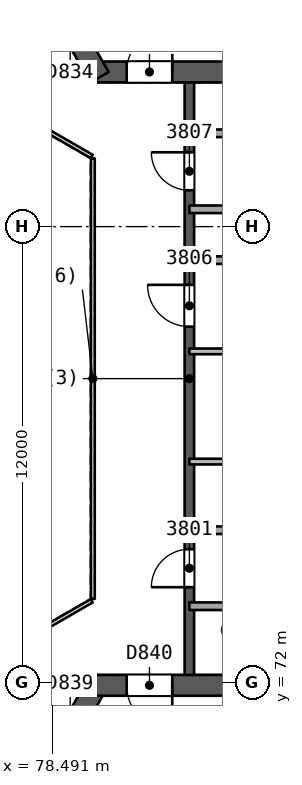
"""IFC4 building model, lengths in metres.
Left out: names, types, materials, properties, quantities, classifications, styles, units other than length and angle.
Written with IfcOpenShell. Run it as: python <this file> out.ifc"""

import sys

from ifc_helpers import new_model, si_unit, direction, frame, frame_2d, origin, place, context, subcontext, project, spatial, rectangle, extrude, element, fill, save


model = new_model("IFC4")
c1 = context("Model", 3, precision=1e-05, world=origin(), true_north=direction((0.0, 1.0)))
c2 = subcontext(c1, "Body", "Model", "MODEL_VIEW")
j1 = project(units=[si_unit("LENGTHUNIT", "METRE"), si_unit("PLANEANGLEUNIT", "RADIAN")], contexts=[c1])
p1 = place(None, origin())
s1 = spatial("IfcSite", under=j1, at=p1, CompositionType="ELEMENT")
p2 = place(p1, origin())
s2 = spatial("IfcBuilding", under=s1, at=p2, CompositionType="ELEMENT")
p3 = place(p2, frame((0.0, 0.0, 160.0)))
s3 = spatial("IfcBuildingStorey", under=s2, at=p3, CompositionType="ELEMENT", Elevation=160.0)
p4 = place(p3, frame((79.659, 88.069, 0.0), z_axis=(0.0, 0.0, 1.0), x_axis=(1.0, 0.0, 0.0)))
e1 = element("IfcWall", 1, at=p4, inside=s3, PredefinedType="SHEAR", context=c2, shape_type="SweptSolid", body=[
    extrude(rectangle(XDim=10.221, YDim=0.55, at=frame_2d((5.111, 0.0))), origin(), (0.0, 0.0, 1.0), 3.7),
])
p5 = place(p4, frame((0.791, 0.0, 0.0)))
e2 = element("IfcOpeningElement", 2, at=p5, cuts=e1, PredefinedType="OPENING", context=c2, shape_type="SweptSolid", body=[
    extrude(rectangle(XDim=1.2, YDim=2.1, at=frame_2d((0.6, 1.05))), frame((0.0, 0.286, 0.0), z_axis=(0.0, -1.0, 0.0), x_axis=(1.0, 0.0, 0.0)), (0.0, 0.0, 1.0), 0.571),
])
p6 = place(p3, frame((74.686, 96.683, 0.0), z_axis=(0.0, 0.0, 1.0), x_axis=(0.499997818338, -0.866026663364, 0.0)))
e3 = element("IfcWall", 3, at=p6, inside=s3, PredefinedType="SHEAR", context=c2, shape_type="SweptSolid", body=[
    extrude(rectangle(XDim=10.105, YDim=0.55, at=frame_2d((5.052, 0.0))), origin(), (0.0, 0.0, 1.0), 3.7),
])
p7 = place(p6, frame((7.955, 0.0, 0.0)))
e4 = element("IfcOpeningElement", 4, at=p7, cuts=e3, PredefinedType="OPENING", context=c2, shape_type="SweptSolid", body=[
    extrude(rectangle(XDim=1.2, YDim=2.1, at=frame_2d((0.6, 1.05))), frame((0.0, 0.286, 0.0), z_axis=(0.0, -1.0, 0.0), x_axis=(1.0, 0.0, 0.0)), (0.0, 0.0, 1.0), 0.571),
])
p8 = place(p3, frame((79.659, 71.931, 0.0), z_axis=(0.0, 0.0, 1.0), x_axis=(-0.500000202252, -0.866025287014, 0.0)))
e5 = element("IfcWall", 5, at=p8, inside=s3, PredefinedType="SHEAR", context=c2, shape_type="SweptSolid", body=[
    extrude(rectangle(XDim=10.221, YDim=0.55, at=frame_2d((5.111, 0.0))), origin(), (0.0, 0.0, 1.0), 3.7),
])
p9 = place(p8, frame((0.791, 0.0, 0.0)))
e6 = element("IfcOpeningElement", 6, at=p9, cuts=e5, PredefinedType="OPENING", context=c2, shape_type="SweptSolid", body=[
    extrude(rectangle(XDim=1.2, YDim=2.1, at=frame_2d((0.6, 1.05))), frame((0.0, 0.286, 0.0), z_axis=(0.0, -1.0, 0.0), x_axis=(1.0, 0.0, 0.0)), (0.0, 0.0, 1.0), 0.571),
])
p10 = place(p3, frame((89.605, 71.931, 0.0), z_axis=(0.0, 0.0, 1.0), x_axis=(-1.0, 0.0, 0.0)))
e7 = element("IfcWall", 7, at=p10, inside=s3, PredefinedType="SHEAR", context=c2, shape_type="SweptSolid", body=[
    extrude(rectangle(XDim=10.105, YDim=0.55, at=frame_2d((5.052, 0.0))), origin(), (0.0, 0.0, 1.0), 3.7),
])
p11 = place(p10, frame((7.955, 0.0, 0.0)))
e8 = element("IfcOpeningElement", 8, at=p11, cuts=e7, PredefinedType="OPENING", context=c2, shape_type="SweptSolid", body=[
    extrude(rectangle(XDim=1.2, YDim=2.1, at=frame_2d((0.6, 1.05))), frame((0.0, 0.286, 0.0), z_axis=(0.0, -1.0, 0.0), x_axis=(1.0, 0.0, 0.0)), (0.0, 0.0, 1.0), 0.571),
])
p12 = place(p3, frame((82.1, 72.206, 0.0), z_axis=(0.0, 0.0, 1.0), x_axis=(0.0, 1.0, 0.0)))
e9 = element("IfcWall", 9, at=p12, inside=s3, PredefinedType="SHEAR", context=c2, shape_type="SweptSolid", body=[
    extrude(rectangle(XDim=15.588, YDim=0.25, at=frame_2d((7.794, 0.0))), origin(), (0.0, 0.0, 1.0), 3.25),
])
p13 = place(p12, frame((2.306, 0.0, 0.0)))
e10 = element("IfcOpeningElement", 10, at=p13, cuts=e9, PredefinedType="OPENING", context=c2, shape_type="SweptSolid", body=[
    extrude(rectangle(XDim=1.0, YDim=2.1, at=frame_2d((0.5, 1.05))), frame((0.0, 0.135, 0.0), z_axis=(0.0, -1.0, 0.0), x_axis=(1.0, 0.0, 0.0)), (0.0, 0.0, 1.0), 0.271),
])
p14 = place(p12, frame((9.162, 0.0, 0.0)))
e11 = element("IfcOpeningElement", 11, at=p14, cuts=e9, PredefinedType="OPENING", context=c2, shape_type="SweptSolid", body=[
    extrude(rectangle(XDim=1.1, YDim=2.1, at=frame_2d((0.55, 1.05))), frame((0.0, 0.135, 0.0), z_axis=(0.0, -1.0, 0.0), x_axis=(1.0, 0.0, 0.0)), (0.0, 0.0, 1.0), 0.271),
])
p15 = place(p12, frame((12.75, 0.0, 0.0)))
e12 = element("IfcOpeningElement", 12, at=p15, cuts=e9, PredefinedType="OPENING", context=c2, shape_type="SweptSolid", body=[
    extrude(rectangle(XDim=1.0, YDim=2.1, at=frame_2d((0.5, 1.05))), frame((0.0, 0.135, 0.0), z_axis=(0.0, -1.0, 0.0), x_axis=(1.0, 0.0, 0.0)), (0.0, 0.0, 1.0), 0.271),
])
p16 = place(p3, frame((82.1, 76.012, 0.0), z_axis=(0.0, 0.0, 1.0), x_axis=(1.0, 0.0, 0.0)))
e13 = element("IfcWall", 13, at=p16, inside=s3, PredefinedType="PARTITIONING", context=c2, shape_type="SweptSolid", body=[
    extrude(rectangle(XDim=9.0, YDim=0.2, at=frame_2d((4.5, 0.0))), origin(), (0.0, 0.0, 1.0), 3.25),
])
p17 = place(p16, frame((4.05, 0.0, 0.0)))
e14 = element("IfcOpeningElement", 14, at=p17, cuts=e13, PredefinedType="OPENING", context=c2, shape_type="SweptSolid", body=[
    extrude(rectangle(XDim=0.9, YDim=2.1, at=frame_2d((0.45, 1.05))), frame((0.0, 0.11, 0.0), z_axis=(0.0, -1.0, 0.0), x_axis=(1.0, 0.0, 0.0)), (0.0, 0.0, 1.0), 0.221),
])
p18 = place(p3, frame((91.1, 74.012, 0.0), z_axis=(0.0, 0.0, 1.0), x_axis=(-1.0, 0.0, 0.0)))
e15 = element("IfcWall", 15, at=p18, inside=s3, PredefinedType="PARTITIONING", context=c2, shape_type="SweptSolid", body=[
    extrude(rectangle(XDim=9.0, YDim=0.2, at=frame_2d((4.5, 0.0))), origin(), (0.0, 0.0, 1.0), 3.25),
])
p19 = place(p3, frame((85.1, 77.818, 0.0), z_axis=(0.0, 0.0, 1.0), x_axis=(-1.0, 0.0, 0.0)))
e16 = element("IfcWall", 16, at=p19, inside=s3, PredefinedType="PARTITIONING", context=c2, shape_type="SweptSolid", body=[
    extrude(rectangle(XDim=3.0, YDim=0.15, at=frame_2d((1.5, 0.0))), origin(), (0.0, 0.0, 1.0), 3.25),
])
p20 = place(p3, frame((82.1, 80.718, 0.0), z_axis=(0.0, 0.0, 1.0), x_axis=(1.0, 0.0, 0.0)))
e17 = element("IfcWall", 17, at=p20, inside=s3, PredefinedType="PARTITIONING", context=c2, shape_type="SweptSolid", body=[
    extrude(rectangle(XDim=3.0, YDim=0.15, at=frame_2d((1.5, 0.0))), origin(), (0.0, 0.0, 1.0), 3.25),
])
p21 = place(p20, frame((1.05, 0.0, 0.0)))
e18 = element("IfcOpeningElement", 18, at=p21, cuts=e17, PredefinedType="OPENING", context=c2, shape_type="SweptSolid", body=[
    extrude(rectangle(XDim=0.9, YDim=2.1, at=frame_2d((0.45, 1.05))), frame((0.0, 0.085, 0.0), z_axis=(0.0, -1.0, 0.0), x_axis=(1.0, 0.0, 0.0)), (0.0, 0.0, 1.0), 0.171),
])
p22 = place(p3, frame((93.726, 83.118, 0.0), z_axis=(0.0, 0.0, 1.0), x_axis=(-1.0, 0.0, 0.0)))
e19 = element("IfcWall", 19, at=p22, inside=s3, PredefinedType="PARTITIONING", context=c2, shape_type="SweptSolid", body=[
    extrude(rectangle(XDim=11.626, YDim=0.2, at=frame_2d((5.813, 0.0))), origin(), (0.0, 0.0, 1.0), 3.25),
])
p23 = place(p3, frame((82.1, 86.456, 0.0), z_axis=(0.0, 0.0, 1.0), x_axis=(1.0, 0.0, 0.0)))
e20 = element("IfcWall", 20, at=p23, inside=s3, PredefinedType="PARTITIONING", context=c2, shape_type="SweptSolid", body=[
    extrude(rectangle(XDim=9.0, YDim=0.2, at=frame_2d((4.5, 0.0))), origin(), (0.0, 0.0, 1.0), 3.25),
])
p24 = place(p23, frame((4.05, 0.0, 0.0)))
e21 = element("IfcOpeningElement", 21, at=p24, cuts=e20, PredefinedType="OPENING", context=c2, shape_type="SweptSolid", body=[
    extrude(rectangle(XDim=0.9, YDim=2.1, at=frame_2d((0.45, 1.05))), frame((0.0, 0.11, 0.0), z_axis=(0.0, -1.0, 0.0), x_axis=(1.0, 0.0, 0.0)), (0.0, 0.0, 1.0), 0.221),
])
p25 = place(p3, frame((91.1, 84.456, 0.0), z_axis=(0.0, 0.0, 1.0), x_axis=(-1.0, 0.0, 0.0)))
e22 = element("IfcWall", 22, at=p25, inside=s3, PredefinedType="PARTITIONING", context=c2, shape_type="SweptSolid", body=[
    extrude(rectangle(XDim=9.0, YDim=0.2, at=frame_2d((4.5, 0.0))), origin(), (0.0, 0.0, 1.0), 3.25),
])
p26 = place(p3, frame((42.059, 82.777, 0.0), z_axis=(0.0, 0.0, 1.0), x_axis=(0.866025745652, 0.499999407868, 0.0)))
e23 = element("IfcWall", 23, at=p26, inside=s3, PredefinedType="SOLIDWALL", context=c2, shape_type="SweptSolid", body=[
    extrude(rectangle(XDim=54.279, YDim=0.3, at=frame_2d((27.14, 0.0))), origin(), (0.0, 0.0, 1.0), 3.25),
])
p27 = place(p26, frame((26.719, 0.0, 0.0)))
e24 = element("IfcOpeningElement", 24, at=p27, cuts=e23, PredefinedType="OPENING", context=c2, shape_type="SweptSolid", body=[
    extrude(rectangle(XDim=2.4, YDim=2.4, at=frame_2d((1.2, 1.2))), frame((0.0, 0.161, 0.0), z_axis=(0.0, -1.0, 0.0), x_axis=(1.0, 0.0, 0.0)), (0.0, 0.0, 1.0), 0.321),
])
p28 = place(p26, frame((31.708, 0.0, 0.0)))
e25 = element("IfcOpeningElement", 25, at=p28, cuts=e23, PredefinedType="OPENING", context=c2, shape_type="SweptSolid", body=[
    extrude(rectangle(XDim=2.4, YDim=2.4, at=frame_2d((1.2, 1.2))), frame((0.0, 0.161, 0.0), z_axis=(0.0, -1.0, 0.0), x_axis=(1.0, 0.0, 0.0)), (0.0, 0.0, 1.0), 0.321),
])
p29 = place(p26, frame((42.175, 0.0, 0.0)))
e26 = element("IfcOpeningElement", 26, at=p29, cuts=e23, PredefinedType="OPENING", context=c2, shape_type="SweptSolid", body=[
    extrude(rectangle(XDim=2.4, YDim=2.4, at=frame_2d((1.2, 1.2))), frame((0.0, 0.161, 0.0), z_axis=(0.0, -1.0, 0.0), x_axis=(1.0, 0.0, 0.0)), (0.0, 0.0, 1.0), 0.321),
])
p30 = place(p26, frame((11.235, 0.0, 0.0)))
e27 = element("IfcOpeningElement", 27, at=p30, cuts=e23, PredefinedType="OPENING", context=c2, shape_type="SweptSolid", body=[
    extrude(rectangle(XDim=2.4, YDim=2.4, at=frame_2d((1.2, 1.2))), frame((0.0, 0.161, 0.0), z_axis=(0.0, -1.0, 0.0), x_axis=(1.0, 0.0, 0.0)), (0.0, 0.0, 1.0), 0.321),
])
p31 = place(p3, frame((89.066, 50.083, 0.0), z_axis=(0.0, 0.0, 1.0), x_axis=(-0.866025745652, 0.499999407868, 0.0)))
e28 = element("IfcWall", 28, at=p31, inside=s3, PredefinedType="SOLIDWALL", context=c2, shape_type="SweptSolid", body=[
    extrude(rectangle(XDim=54.279, YDim=0.3, at=frame_2d((27.14, 0.0))), origin(), (0.0, 0.0, 1.0), 3.25),
])
p32 = place(p31, frame((41.112, 0.0, 0.0)))
e29 = element("IfcOpeningElement", 29, at=p32, cuts=e28, PredefinedType="OPENING", context=c2, shape_type="SweptSolid", body=[
    extrude(rectangle(XDim=2.4, YDim=2.4, at=frame_2d((1.2, 1.2))), frame((0.0, 0.161, 0.0), z_axis=(0.0, -1.0, 0.0), x_axis=(1.0, 0.0, 0.0)), (0.0, 0.0, 1.0), 0.321),
])
p33 = place(p31, frame((11.235, 0.0, 0.0)))
e30 = element("IfcOpeningElement", 30, at=p33, cuts=e28, PredefinedType="OPENING", context=c2, shape_type="SweptSolid", body=[
    extrude(rectangle(XDim=2.4, YDim=2.4, at=frame_2d((1.2, 1.2))), frame((0.0, 0.161, 0.0), z_axis=(0.0, -1.0, 0.0), x_axis=(1.0, 0.0, 0.0)), (0.0, 0.0, 1.0), 0.321),
])
p34 = place(p31, frame((28.032, 0.0, 0.9)))
e31 = element("IfcOpeningElement", 31, at=p34, cuts=e28, PredefinedType="OPENING", context=c2, shape_type="SweptSolid", body=[
    extrude(rectangle(XDim=1.8, YDim=1.5, at=frame_2d((0.9, 0.75))), frame((0.0, 0.161, 0.0), z_axis=(0.0, -1.0, 0.0), x_axis=(1.0, 0.0, 0.0)), (0.0, 0.0, 1.0), 0.321),
])
p35 = place(p31, frame((25.382, 0.0, 0.9)))
e32 = element("IfcOpeningElement", 32, at=p35, cuts=e28, PredefinedType="OPENING", context=c2, shape_type="SweptSolid", body=[
    extrude(rectangle(XDim=1.8, YDim=1.5, at=frame_2d((0.9, 0.75))), frame((0.0, 0.161, 0.0), z_axis=(0.0, -1.0, 0.0), x_axis=(1.0, 0.0, 0.0)), (0.0, 0.0, 1.0), 0.321),
])
p36 = place(p3, frame((79.56, 74.206, 0.0), z_axis=(0.0, 0.0, 1.0), x_axis=(0.0, 1.0, 0.0)))
e33 = element("IfcWall", 33, at=p36, inside=s3, PredefinedType="PARTITIONING", context=c2, shape_type="SweptSolid", body=[
    extrude(rectangle(XDim=11.588, YDim=0.1, at=frame_2d((5.794, 0.0))), origin(), (0.0, 0.0, 1.0), 3.25),
])
for number, where, z_axis, x_axis in (
    (34, (79.53, 85.846, 0.0), (0.0, 0.0, 1.0), (-0.866, 0.5, 0.0)),
    (35, (77.798, 73.154, 0.0), (0.0, 0.0, 1.0), (0.866, 0.5, 0.0)),
):
    element("IfcWall", number, at=place(p3, frame(where, z_axis=z_axis, x_axis=x_axis)), inside=s3, PredefinedType="PARTITIONING", context=c2, shape_type="SweptSolid", body=[
        extrude(rectangle(XDim=2.0, YDim=0.1, at=frame_2d((1.0, 0.0))), origin(), (0.0, 0.0, 1.0), 3.25),
    ])
p37 = place(p13, origin())
e36 = element("IfcDoor", 36, at=p37, inside=s3, OperationType="SINGLE_SWING_LEFT", PredefinedType="NOTDEFINED", context=c2, shape_type="SweptSolid", body=[
    extrude(rectangle(XDim=1.0, YDim=2.1, at=frame_2d((0.5, 1.05))), frame((0.0, 0.025, 0.0), z_axis=(0.0, -1.0, 0.0), x_axis=(1.0, 0.0, 0.0)), (0.0, 0.0, 1.0), 0.05),
])
fill(e10, e36)
p38 = place(p14, origin())
e37 = element("IfcDoor", 37, at=p38, inside=s3, OperationType="SINGLE_SWING_RIGHT", PredefinedType="NOTDEFINED", context=c2, shape_type="SweptSolid", body=[
    extrude(rectangle(XDim=1.1, YDim=2.1, at=frame_2d((0.55, 1.05))), frame((0.0, 0.025, 0.0), z_axis=(0.0, -1.0, 0.0), x_axis=(1.0, 0.0, 0.0)), (0.0, 0.0, 1.0), 0.05),
])
fill(e11, e37)
p39 = place(p15, origin())
e38 = element("IfcDoor", 38, at=p39, inside=s3, OperationType="SINGLE_SWING_RIGHT", PredefinedType="NOTDEFINED", context=c2, shape_type="SweptSolid", body=[
    extrude(rectangle(XDim=1.0, YDim=2.1, at=frame_2d((0.5, 1.05))), frame((0.0, 0.025, 0.0), z_axis=(0.0, -1.0, 0.0), x_axis=(1.0, 0.0, 0.0)), (0.0, 0.0, 1.0), 0.05),
])
fill(e12, e38)
p40 = place(p5, origin())
e39 = element("IfcDoor", 39, at=p40, inside=s3, OperationType="SINGLE_SWING_RIGHT", PredefinedType="NOTDEFINED", context=c2, shape_type="SweptSolid", body=[
    extrude(rectangle(XDim=1.2, YDim=2.1, at=frame_2d((0.6, 1.05))), frame((0.0, 0.025, 0.0), z_axis=(0.0, -1.0, 0.0), x_axis=(1.0, 0.0, 0.0)), (0.0, 0.0, 1.0), 0.05),
])
fill(e2, e39)
p41 = place(p11, origin())
e40 = element("IfcDoor", 40, at=p41, inside=s3, OperationType="SINGLE_SWING_LEFT", PredefinedType="NOTDEFINED", context=c2, shape_type="SweptSolid", body=[
    extrude(rectangle(XDim=1.2, YDim=2.1, at=frame_2d((0.6, 1.05))), frame((0.0, 0.025, 0.0), z_axis=(0.0, -1.0, 0.0), x_axis=(1.0, 0.0, 0.0)), (0.0, 0.0, 1.0), 0.05),
])
fill(e8, e40)
save(model, sys.argv[1])
